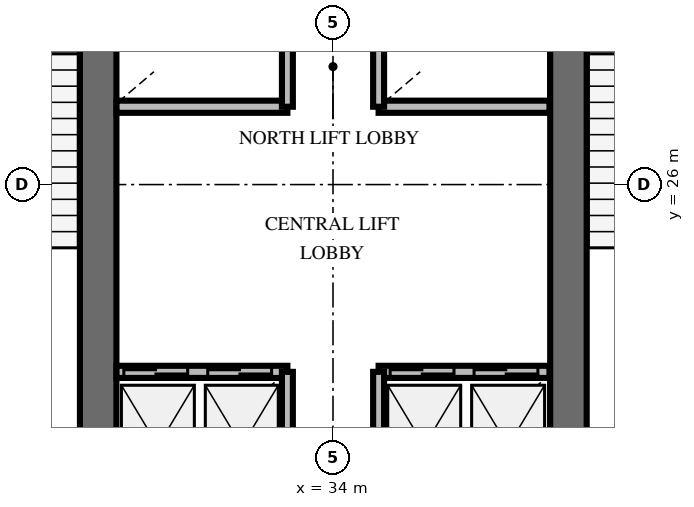
"""IFC4 building model, lengths in metres.
Left out: names, types, materials, properties, quantities, classifications, styles, units other than length and angle.
Written with IfcOpenShell. Run it as: python <this file> out.ifc"""

import sys

from ifc_helpers import new_model, si_unit, direction, frame, frame_2d, origin, place, context, subcontext, project, spatial, rectangle, extrude, element, fill, save


model = new_model("IFC4")
c1 = context("Model", 3, precision=1e-05, world=origin(), true_north=direction((0.0, 1.0)))
c2 = subcontext(c1, "Body", "Model", "MODEL_VIEW")
j1 = project(units=[si_unit("LENGTHUNIT", "METRE"), si_unit("PLANEANGLEUNIT", "RADIAN")], contexts=[c1])
p1 = place(None, origin())
s1 = spatial("IfcSite", under=j1, at=p1, CompositionType="ELEMENT")
p2 = place(p1, origin())
s2 = spatial("IfcBuilding", under=s1, at=p2, CompositionType="ELEMENT")
p3 = place(p2, frame((0.0, 0.0, 121.8)))
s3 = spatial("IfcBuildingStorey", under=s2, at=p3, CompositionType="ELEMENT", Elevation=121.8)
for number, where, z_axis, x_axis in (
    (1, (30.138, 20.187, 0.0), (0.0, 0.0, 1.0), (0.0, 1.0, 0.0)),
    (2, (37.872, 20.187, 0.0), (0.0, 0.0, 1.0), (0.0, 1.0, 0.0)),
):
    element("IfcWall", number, at=place(p3, frame(where, z_axis=z_axis, x_axis=x_axis)), inside=s3, PredefinedType="SHEAR", context=c2, shape_type="SweptSolid", body=[
        extrude(rectangle(XDim=9.826, YDim=0.6, at=frame_2d((4.913, 0.0))), origin(), (0.0, 0.0, 1.0), 4.0),
    ])
p4 = place(p3, frame((30.44, 22.92, 0.0), z_axis=(0.0, 0.0, 1.0), x_axis=(1.0, 0.0, 0.0)))
e3 = element("IfcWall", 3, at=p4, inside=s3, PredefinedType="SOLIDWALL", context=c2, shape_type="SweptSolid", body=[
    extrude(rectangle(XDim=2.81, YDim=0.2, at=frame_2d((1.405, 0.0))), origin(), (0.0, 0.0, 1.0), 2.8),
])
p5 = place(p4, frame((0.12, 0.0, 0.0)))
e4 = element("IfcOpeningElement", 4, at=p5, cuts=e3, PredefinedType="OPENING", context=c2, shape_type="SweptSolid", body=[
    extrude(rectangle(XDim=1.05, YDim=2.1, at=frame_2d((0.525, 1.05))), frame((0.0, 0.11, 0.0), z_axis=(0.0, -1.0, 0.0), x_axis=(1.0, 0.0, 0.0)), (0.0, 0.0, 1.0), 0.22),
])
p6 = place(p4, frame((1.5, 0.0, 0.0)))
e5 = element("IfcOpeningElement", 5, at=p6, cuts=e3, PredefinedType="OPENING", context=c2, shape_type="SweptSolid", body=[
    extrude(rectangle(XDim=1.05, YDim=2.1, at=frame_2d((0.525, 1.05))), frame((0.0, 0.11, 0.0), z_axis=(0.0, -1.0, 0.0), x_axis=(1.0, 0.0, 0.0)), (0.0, 0.0, 1.0), 0.22),
])
p7 = place(p3, frame((33.25, 20.5, 0.0), z_axis=(0.0, 0.0, 1.0), x_axis=(0.0, 1.0, 0.0)))
e6 = element("IfcWall", 6, at=p7, inside=s3, PredefinedType="SOLIDWALL", context=c2, shape_type="SweptSolid", body=[
    extrude(rectangle(XDim=2.42, YDim=0.18, at=frame_2d((1.21, 0.0))), origin(), (0.0, 0.0, 1.0), 2.8),
])
p8 = place(p3, frame((34.75, 22.92, 0.0), z_axis=(0.0, 0.0, 1.0), x_axis=(1.0, 0.0, 0.0)))
e7 = element("IfcWall", 7, at=p8, inside=s3, PredefinedType="SOLIDWALL", context=c2, shape_type="SweptSolid", body=[
    extrude(rectangle(XDim=2.81, YDim=0.2, at=frame_2d((1.405, 0.0))), origin(), (0.0, 0.0, 1.0), 2.8),
])
p9 = place(p8, frame((0.19, 0.0, 0.0)))
e8 = element("IfcOpeningElement", 8, at=p9, cuts=e7, PredefinedType="OPENING", context=c2, shape_type="SweptSolid", body=[
    extrude(rectangle(XDim=1.05, YDim=2.1, at=frame_2d((0.525, 1.05))), frame((0.0, 0.11, 0.0), z_axis=(0.0, -1.0, 0.0), x_axis=(1.0, 0.0, 0.0)), (0.0, 0.0, 1.0), 0.22),
])
p10 = place(p8, frame((1.57, 0.0, 0.0)))
e9 = element("IfcOpeningElement", 9, at=p10, cuts=e7, PredefinedType="OPENING", context=c2, shape_type="SweptSolid", body=[
    extrude(rectangle(XDim=1.05, YDim=2.1, at=frame_2d((0.525, 1.05))), frame((0.0, 0.11, 0.0), z_axis=(0.0, -1.0, 0.0), x_axis=(1.0, 0.0, 0.0)), (0.0, 0.0, 1.0), 0.22),
])
p11 = place(p3, frame((34.75, 20.5, 0.0), z_axis=(0.0, 0.0, 1.0), x_axis=(0.0, 1.0, 0.0)))
e10 = element("IfcWall", 10, at=p11, inside=s3, PredefinedType="SOLIDWALL", context=c2, shape_type="SweptSolid", body=[
    extrude(rectangle(XDim=2.42, YDim=0.18, at=frame_2d((1.21, 0.0))), origin(), (0.0, 0.0, 1.0), 2.8),
])
p12 = place(p3, frame((30.44, 27.28, 0.0), z_axis=(0.0, 0.0, 1.0), x_axis=(1.0, 0.0, 0.0)))
e11 = element("IfcWall", 11, at=p12, inside=s3, PredefinedType="SOLIDWALL", context=c2, shape_type="SweptSolid", body=[
    extrude(rectangle(XDim=2.81, YDim=0.2, at=frame_2d((1.405, 0.0))), origin(), (0.0, 0.0, 1.0), 2.8),
])
p13 = place(p3, frame((33.25, 27.28, 0.0), z_axis=(0.0, 0.0, 1.0), x_axis=(0.0, 1.0, 0.0)))
e12 = element("IfcWall", 12, at=p13, inside=s3, PredefinedType="SOLIDWALL", context=c2, shape_type="SweptSolid", body=[
    extrude(rectangle(XDim=2.47, YDim=0.18, at=frame_2d((1.235, 0.0))), origin(), (0.0, 0.0, 1.0), 2.8),
])
p14 = place(p3, frame((34.75, 27.28, 0.0), z_axis=(0.0, 0.0, 1.0), x_axis=(1.0, 0.0, 0.0)))
e13 = element("IfcWall", 13, at=p14, inside=s3, PredefinedType="SOLIDWALL", context=c2, shape_type="SweptSolid", body=[
    extrude(rectangle(XDim=2.81, YDim=0.2, at=frame_2d((1.405, 0.0))), origin(), (0.0, 0.0, 1.0), 2.8),
])
p15 = place(p3, frame((34.75, 27.28, 0.0), z_axis=(0.0, 0.0, 1.0), x_axis=(0.0, 1.0, 0.0)))
e14 = element("IfcWall", 14, at=p15, inside=s3, PredefinedType="SOLIDWALL", context=c2, shape_type="SweptSolid", body=[
    extrude(rectangle(XDim=2.47, YDim=0.18, at=frame_2d((1.235, 0.0))), origin(), (0.0, 0.0, 1.0), 2.8),
])
p16 = place(p5, origin())
e15 = element("IfcDoor", 15, at=p16, inside=s3, OperationType="DOUBLE_DOOR_SLIDING", PredefinedType="USERDEFINED", context=c2, shape_type="SweptSolid", body=[
    extrude(rectangle(XDim=1.05, YDim=2.1, at=frame_2d((0.525, 1.05))), frame((0.0, 0.025, 0.0), z_axis=(0.0, -1.0, 0.0), x_axis=(1.0, 0.0, 0.0)), (0.0, 0.0, 1.0), 0.05),
])
fill(e4, e15)
p17 = place(p6, origin())
e16 = element("IfcDoor", 16, at=p17, inside=s3, OperationType="DOUBLE_DOOR_SLIDING", PredefinedType="USERDEFINED", context=c2, shape_type="SweptSolid", body=[
    extrude(rectangle(XDim=1.05, YDim=2.1, at=frame_2d((0.525, 1.05))), frame((0.0, 0.025, 0.0), z_axis=(0.0, -1.0, 0.0), x_axis=(1.0, 0.0, 0.0)), (0.0, 0.0, 1.0), 0.05),
])
fill(e5, e16)
p18 = place(p9, origin())
e17 = element("IfcDoor", 17, at=p18, inside=s3, OperationType="DOUBLE_DOOR_SLIDING", PredefinedType="USERDEFINED", context=c2, shape_type="SweptSolid", body=[
    extrude(rectangle(XDim=1.05, YDim=2.1, at=frame_2d((0.525, 1.05))), frame((0.0, 0.025, 0.0), z_axis=(0.0, -1.0, 0.0), x_axis=(1.0, 0.0, 0.0)), (0.0, 0.0, 1.0), 0.05),
])
fill(e8, e17)
p19 = place(p10, origin())
e18 = element("IfcDoor", 18, at=p19, inside=s3, OperationType="DOUBLE_DOOR_SLIDING", PredefinedType="USERDEFINED", context=c2, shape_type="SweptSolid", body=[
    extrude(rectangle(XDim=1.05, YDim=2.1, at=frame_2d((0.525, 1.05))), frame((0.0, 0.025, 0.0), z_axis=(0.0, -1.0, 0.0), x_axis=(1.0, 0.0, 0.0)), (0.0, 0.0, 1.0), 0.05),
])
fill(e9, e18)
save(model, sys.argv[1])
